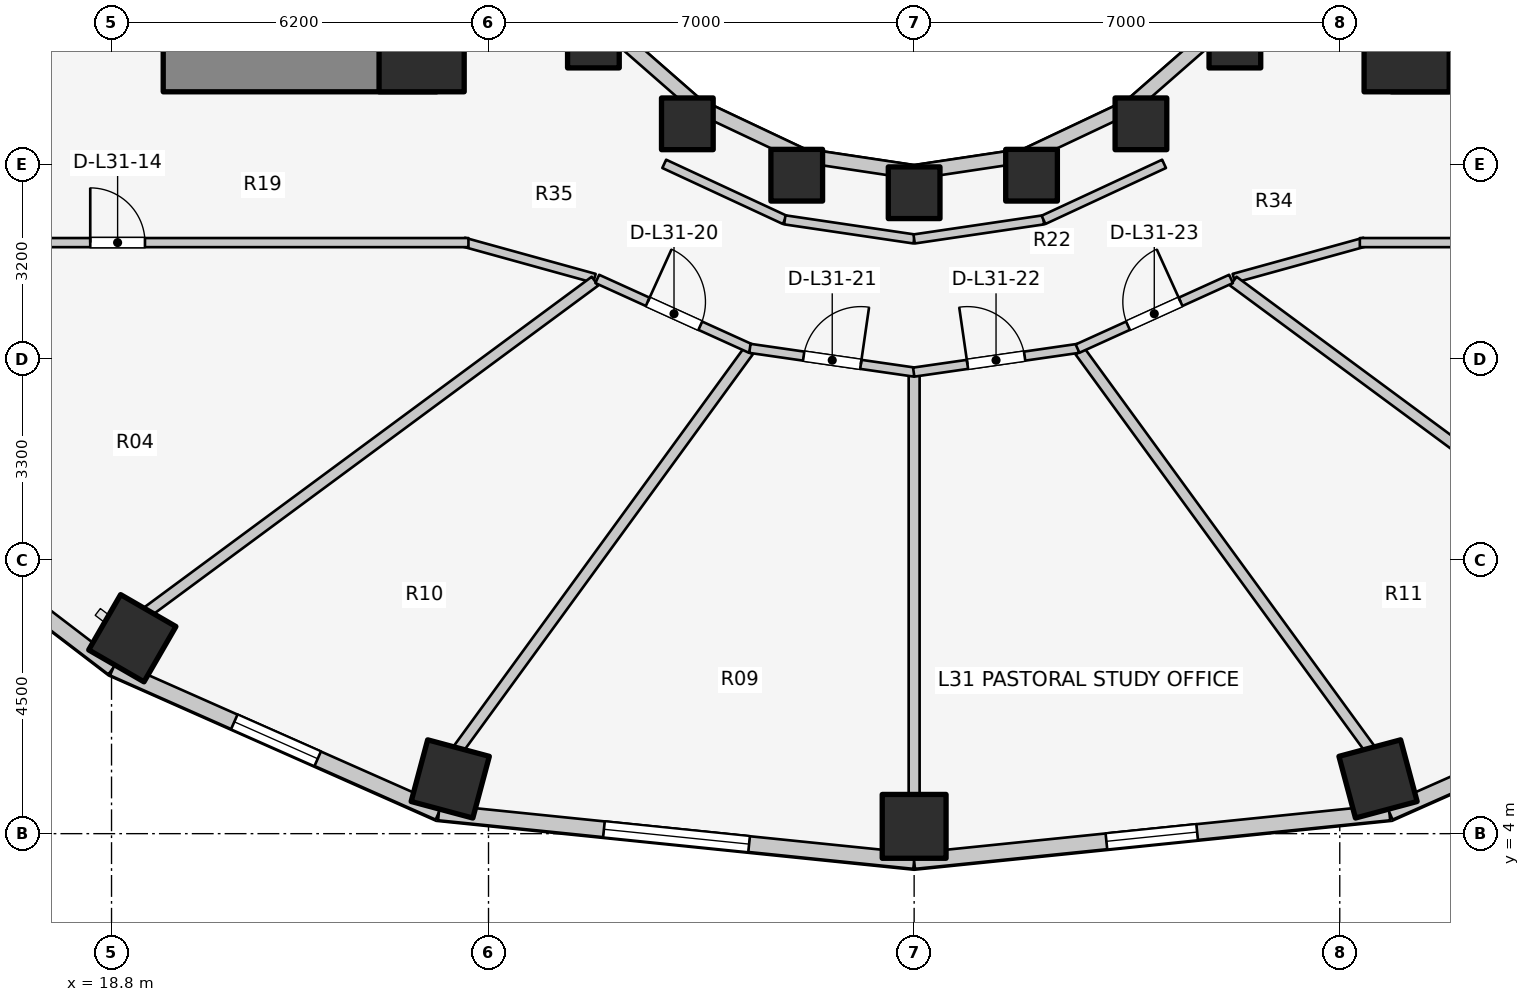
"""IFC4 building model, lengths in metres.
Left out: names, types, materials, properties, quantities, classifications, styles, units other than length and angle.
Written with IfcOpenShell. Run it as: python <this file> out.ifc"""

import sys

from ifc_helpers import new_model, si_unit, direction, frame, frame_2d, origin, origin_2d, place, context, subcontext, project, spatial, rectangle, extrude, element, fill, save


model = new_model("IFC4")
c1 = context("Model", 3, precision=1e-05, world=origin(), true_north=direction((0.0, 1.0)))
c2 = subcontext(c1, "Body", "Model", "MODEL_VIEW")
j1 = project(units=[si_unit("LENGTHUNIT", "METRE"), si_unit("PLANEANGLEUNIT", "RADIAN")], contexts=[c1])
p1 = place(None, origin())
s1 = spatial("IfcSite", under=j1, at=p1, CompositionType="ELEMENT")
p2 = place(p1, origin())
s2 = spatial("IfcBuilding", under=s1, at=p2, CompositionType="ELEMENT")
p3 = place(p2, frame((0.0, 0.0, 104.2)))
s3 = spatial("IfcBuildingStorey", under=s2, at=p3, CompositionType="ELEMENT", Elevation=104.2)
for number, where, z_axis, x_axis in (
    (1, (19.65, 16.55, 0.0), (0.0, 0.0, 1.0), (1.0, 0.0, 0.0)),
    (2, (39.85, 16.55, 0.0), (0.0, 0.0, 1.0), (1.0, 0.0, 0.0)),
):
    element("IfcWall", number, at=place(p3, frame(where, z_axis=z_axis, x_axis=x_axis)), inside=s3, PredefinedType="SHEAR", context=c2, shape_type="SweptSolid", body=[
        extrude(rectangle(XDim=4.5, YDim=0.7, at=frame_2d((2.25, 0.0))), origin(), (0.0, 0.0, 1.0), 3.1),
    ])
for number, where, z_axis, x_axis in (
    (3, (23.9, 16.9, 0.0), (0.0, 0.0, 1.0), (1.0, 0.0, 0.0)),
    (4, (40.1, 16.9, 0.0), (0.0, 0.0, 1.0), (1.0, 0.0, 0.0)),
):
    element("IfcColumn", number, at=place(p3, frame(where, z_axis=z_axis, x_axis=x_axis)), inside=s3, PredefinedType="COLUMN", context=c2, shape_type="SweptSolid", body=[
        extrude(rectangle(XDim=1.4, YDim=1.4, at=origin_2d()), origin(), (0.0, 0.0, 1.0), 3.1),
    ])
for number, where, z_axis, x_axis in (
    (5, (26.725, 17.018, 0.0), (0.0, 0.0, 1.0), (1.0, 0.0, 0.0)),
    (6, (28.27, 15.673, 0.0), (0.0, 0.0, 1.0), (1.0, 0.0, 0.0)),
):
    element("IfcColumn", number, at=place(p3, frame(where, z_axis=z_axis, x_axis=x_axis)), inside=s3, PredefinedType="COLUMN", context=c2, shape_type="SweptSolid", body=[
        extrude(rectangle(XDim=0.85, YDim=0.85, at=origin_2d()), origin(), (0.0, 0.0, 1.0), 3.1),
    ])
p4 = place(p3, frame((19.142, 7.214, 0.0), z_axis=(0.0, 0.0, 1.0), x_axis=(-0.5, -0.866025403784, 0.0)))
e7 = element("IfcColumn", 7, at=p4, inside=s3, PredefinedType="COLUMN", context=c2, shape_type="SweptSolid", body=[
    extrude(rectangle(XDim=1.05, YDim=1.05, at=origin_2d()), origin(), (0.0, 0.0, 1.0), 3.1),
])
p5 = place(p3, frame((30.069, 14.828, 0.0), z_axis=(0.0, 0.0, 1.0), x_axis=(1.0, 0.0, 0.0)))
e8 = element("IfcColumn", 8, at=p5, inside=s3, PredefinedType="COLUMN", context=c2, shape_type="SweptSolid", body=[
    extrude(rectangle(XDim=0.85, YDim=0.85, at=origin_2d()), origin(), (0.0, 0.0, 1.0), 3.1),
])
p6 = place(p3, frame((24.371, 4.9, 0.0), z_axis=(0.0, 0.0, 1.0), x_axis=(-0.258819045103, -0.965925826289, 0.0)))
e9 = element("IfcColumn", 9, at=p6, inside=s3, PredefinedType="COLUMN", context=c2, shape_type="SweptSolid", body=[
    extrude(rectangle(XDim=1.05, YDim=1.05, at=origin_2d()), origin(), (0.0, 0.0, 1.0), 3.1),
])
p7 = place(p3, frame((32.0, 14.54, 0.0), z_axis=(0.0, 0.0, 1.0), x_axis=(1.0, 0.0, 0.0)))
e10 = element("IfcColumn", 10, at=p7, inside=s3, PredefinedType="COLUMN", context=c2, shape_type="SweptSolid", body=[
    extrude(rectangle(XDim=0.85, YDim=0.85, at=origin_2d()), origin(), (0.0, 0.0, 1.0), 3.1),
])
p8 = place(p3, frame((32.0, 4.12, 0.0), z_axis=(0.0, 0.0, 1.0), x_axis=(0.0, -1.0, 0.0)))
e11 = element("IfcColumn", 11, at=p8, inside=s3, PredefinedType="COLUMN", context=c2, shape_type="SweptSolid", body=[
    extrude(rectangle(XDim=1.05, YDim=1.05, at=origin_2d()), origin(), (0.0, 0.0, 1.0), 3.1),
])
p9 = place(p3, frame((33.931, 14.828, 0.0), z_axis=(0.0, 0.0, 1.0), x_axis=(1.0, 0.0, 0.0)))
e12 = element("IfcColumn", 12, at=p9, inside=s3, PredefinedType="COLUMN", context=c2, shape_type="SweptSolid", body=[
    extrude(rectangle(XDim=0.85, YDim=0.85, at=origin_2d()), origin(), (0.0, 0.0, 1.0), 3.1),
])
p10 = place(p3, frame((39.629, 4.9, 0.0), z_axis=(0.0, 0.0, 1.0), x_axis=(0.258819045103, -0.965925826289, 0.0)))
e13 = element("IfcColumn", 13, at=p10, inside=s3, PredefinedType="COLUMN", context=c2, shape_type="SweptSolid", body=[
    extrude(rectangle(XDim=1.05, YDim=1.05, at=origin_2d()), origin(), (0.0, 0.0, 1.0), 3.1),
])
for number, where, z_axis, x_axis in (
    (14, (35.73, 15.673, 0.0), (0.0, 0.0, 1.0), (1.0, 0.0, 0.0)),
    (15, (37.275, 17.018, 0.0), (0.0, 0.0, 1.0), (1.0, 0.0, 0.0)),
):
    element("IfcColumn", number, at=place(p3, frame(where, z_axis=z_axis, x_axis=x_axis)), inside=s3, PredefinedType="COLUMN", context=c2, shape_type="SweptSolid", body=[
        extrude(rectangle(XDim=0.85, YDim=0.85, at=origin_2d()), origin(), (0.0, 0.0, 1.0), 3.1),
    ])
p11 = place(p3, frame((26.965, 17.258, 0.0), z_axis=(0.0, 0.0, 1.0), x_axis=(0.752576694707, -0.658504607869, 0.0)))
e16 = element("IfcWall", 16, at=p11, inside=s3, PredefinedType="STANDARD", context=c2, shape_type="SweptSolid", body=[
    extrude(rectangle(XDim=1.959, YDim=0.23, at=frame_2d((0.98, 0.0))), origin(), (0.0, 0.0, 1.0), 2.16),
])
p12 = place(p3, frame((28.44, 15.968, 0.0), z_axis=(0.0, 0.0, 1.0), x_axis=(0.904179699603, -0.427152280606, 0.0)))
e17 = element("IfcWall", 17, at=p12, inside=s3, PredefinedType="STANDARD", context=c2, shape_type="SweptSolid", body=[
    extrude(rectangle(XDim=1.899, YDim=0.23, at=frame_2d((0.95, 0.0))), origin(), (0.0, 0.0, 1.0), 2.16),
])
for number, where, z_axis, x_axis in (
    (18, (30.157, 15.157, 0.0), (0.0, 0.0, 1.0), (0.989, -0.149, 0.0)),
    (19, (32.0, 14.88, 0.0), (0.0, 0.0, 1.0), (0.989, 0.149, 0.0)),
):
    element("IfcWall", number, at=place(p3, frame(where, z_axis=z_axis, x_axis=x_axis)), inside=s3, PredefinedType="STANDARD", context=c2, shape_type="SweptSolid", body=[
        extrude(rectangle(XDim=1.864, YDim=0.23, at=frame_2d((0.932, 0.0))), origin(), (0.0, 0.0, 1.0), 2.16),
    ])
p13 = place(p3, frame((33.843, 15.157, 0.0), z_axis=(0.0, 0.0, 1.0), x_axis=(0.904179699603, 0.427152280606, 0.0)))
e20 = element("IfcWall", 20, at=p13, inside=s3, PredefinedType="STANDARD", context=c2, shape_type="SweptSolid", body=[
    extrude(rectangle(XDim=1.899, YDim=0.23, at=frame_2d((0.95, 0.0))), origin(), (0.0, 0.0, 1.0), 2.16),
])
p14 = place(p3, frame((35.56, 15.968, 0.0), z_axis=(0.0, 0.0, 1.0), x_axis=(0.752576694707, 0.658504607869, 0.0)))
e21 = element("IfcWall", 21, at=p14, inside=s3, PredefinedType="STANDARD", context=c2, shape_type="SweptSolid", body=[
    extrude(rectangle(XDim=1.959, YDim=0.23, at=frame_2d((0.98, 0.0))), origin(), (0.0, 0.0, 1.0), 2.16),
])
p15 = place(p3, frame((14.734, 9.847, 0.0), z_axis=(0.0, 0.0, 1.0), x_axis=(0.794809810864, -0.606858603427, 0.0)))
e22 = element("IfcWall", 22, at=p15, inside=s3, PredefinedType="STANDARD", context=c2, shape_type="SweptSolid", body=[
    extrude(rectangle(XDim=5.149, YDim=0.26, at=frame_2d((2.575, 0.0))), origin(), (0.0, 0.0, 1.0), 2.85),
])
p16 = place(p3, frame((18.827, 6.722, 0.0), z_axis=(0.0, 0.0, 1.0), x_axis=(0.914336605747, -0.404955023911, 0.0)))
e23 = element("IfcWall", 23, at=p16, inside=s3, PredefinedType="STANDARD", context=c2, shape_type="SweptSolid", body=[
    extrude(rectangle(XDim=5.859, YDim=0.26, at=frame_2d((2.929, 0.0))), origin(), (0.0, 0.0, 1.0), 2.85),
])
p17 = place(p16, frame((2.179, 0.0, 0.75)))
e24 = element("IfcOpeningElement", 24, at=p17, cuts=e23, PredefinedType="OPENING", context=c2, shape_type="SweptSolid", body=[
    extrude(rectangle(XDim=1.5, YDim=1.6, at=frame_2d((0.75, 0.8))), frame((0.0, 0.14, 0.0), z_axis=(0.0, -1.0, 0.0), x_axis=(1.0, 0.0, 0.0)), (0.0, 0.0, 1.0), 0.28),
])
p18 = place(p3, frame((24.184, 4.349, 0.0), z_axis=(0.0, 0.0, 1.0), x_axis=(0.994821390558, -0.101638579726, 0.0)))
e25 = element("IfcWall", 25, at=p18, inside=s3, PredefinedType="STANDARD", context=c2, shape_type="SweptSolid", body=[
    extrude(rectangle(XDim=7.857, YDim=0.26, at=frame_2d((3.929, 0.0))), origin(), (0.0, 0.0, 1.0), 2.85),
])
p19 = place(p18, frame((2.729, 0.0, 0.75)))
e26 = element("IfcOpeningElement", 26, at=p19, cuts=e25, PredefinedType="OPENING", context=c2, shape_type="SweptSolid", body=[
    extrude(rectangle(XDim=2.4, YDim=1.7, at=frame_2d((1.2, 0.85))), frame((0.0, 0.14, 0.0), z_axis=(0.0, -1.0, 0.0), x_axis=(1.0, 0.0, 0.0)), (0.0, 0.0, 1.0), 0.28),
])
p20 = place(p3, frame((32.0, 3.551, 0.0), z_axis=(0.0, 0.0, 1.0), x_axis=(0.994821390558, 0.101638579726, 0.0)))
e27 = element("IfcWall", 27, at=p20, inside=s3, PredefinedType="STANDARD", context=c2, shape_type="SweptSolid", body=[
    extrude(rectangle(XDim=7.857, YDim=0.26, at=frame_2d((3.929, 0.0))), origin(), (0.0, 0.0, 1.0), 2.85),
])
p21 = place(p20, frame((3.178, 0.0, 0.75)))
e28 = element("IfcOpeningElement", 28, at=p21, cuts=e27, PredefinedType="OPENING", context=c2, shape_type="SweptSolid", body=[
    extrude(rectangle(XDim=1.5, YDim=1.6, at=frame_2d((0.75, 0.8))), frame((0.0, 0.14, 0.0), z_axis=(0.0, -1.0, 0.0), x_axis=(1.0, 0.0, 0.0)), (0.0, 0.0, 1.0), 0.28),
])
p22 = place(p3, frame((39.816, 4.349, 0.0), z_axis=(0.0, 0.0, 1.0), x_axis=(0.914336605747, 0.404955023911, 0.0)))
e29 = element("IfcWall", 29, at=p22, inside=s3, PredefinedType="STANDARD", context=c2, shape_type="SweptSolid", body=[
    extrude(rectangle(XDim=5.859, YDim=0.26, at=frame_2d((2.929, 0.0))), origin(), (0.0, 0.0, 1.0), 2.85),
])
p23 = place(p22, frame((2.179, 0.0, 0.75)))
e30 = element("IfcOpeningElement", 30, at=p23, cuts=e29, PredefinedType="OPENING", context=c2, shape_type="SweptSolid", body=[
    extrude(rectangle(XDim=1.5, YDim=1.6, at=frame_2d((0.75, 0.8))), frame((0.0, 0.14, 0.0), z_axis=(0.0, -1.0, 0.0), x_axis=(1.0, 0.0, 0.0)), (0.0, 0.0, 1.0), 0.28),
])
p24 = place(p3, frame((27.89, 15.015, 0.0), z_axis=(0.0, 0.0, 1.0), x_axis=(0.906943449489, -0.421252393975, 0.0)))
e31 = element("IfcWall", 31, at=p24, inside=s3, PredefinedType="PARTITIONING", context=c2, shape_type="SweptSolid", body=[
    extrude(rectangle(XDim=2.186, YDim=0.15, at=frame_2d((1.093, 0.0))), origin(), (0.0, 0.0, 1.0), 2.272),
])
for number, where, z_axis, x_axis in (
    (32, (29.873, 14.094, 0.0), (0.0, 0.0, 1.0), (0.989, -0.146, 0.0)),
    (33, (32.0, 13.78, 0.0), (0.0, 0.0, 1.0), (0.989, 0.146, 0.0)),
):
    element("IfcWall", number, at=place(p3, frame(where, z_axis=z_axis, x_axis=x_axis)), inside=s3, PredefinedType="PARTITIONING", context=c2, shape_type="SweptSolid", body=[
        extrude(rectangle(XDim=2.151, YDim=0.15, at=frame_2d((1.075, 0.0))), origin(), (0.0, 0.0, 1.0), 2.272),
    ])
p25 = place(p3, frame((34.127, 14.094, 0.0), z_axis=(0.0, 0.0, 1.0), x_axis=(0.906943449489, 0.421252393975, 0.0)))
e34 = element("IfcWall", 34, at=p25, inside=s3, PredefinedType="PARTITIONING", context=c2, shape_type="SweptSolid", body=[
    extrude(rectangle(XDim=2.186, YDim=0.15, at=frame_2d((1.093, 0.0))), origin(), (0.0, 0.0, 1.0), 2.272),
])
p26 = place(p3, frame((26.742, 13.133, 0.0), z_axis=(0.0, 0.0, 1.0), x_axis=(-0.963833843713, 0.266503886865, 0.0)))
e35 = element("IfcWall", 35, at=p26, inside=s3, PredefinedType="PARTITIONING", context=c2, shape_type="SweptSolid", body=[
    extrude(rectangle(XDim=2.232, YDim=0.15, at=frame_2d((1.116, 0.0))), origin(), (0.0, 0.0, 1.0), 2.272),
])
p27 = place(p3, frame((17.15, 13.72, 0.0), z_axis=(0.0, 0.0, 1.0), x_axis=(1.0, 0.0, 0.0)))
e36 = element("IfcWall", 36, at=p27, inside=s3, PredefinedType="PARTITIONING", context=c2, shape_type="SweptSolid", body=[
    extrude(rectangle(XDim=7.52, YDim=0.15, at=frame_2d((3.76, 0.0))), origin(), (0.0, 0.0, 1.0), 2.272),
])
p28 = place(p27, frame((1.3, 0.0, 0.0)))
e37 = element("IfcOpeningElement", 37, at=p28, cuts=e36, PredefinedType="OPENING", context=c2, shape_type="SweptSolid", body=[
    extrude(rectangle(XDim=0.9, YDim=2.1, at=frame_2d((0.45, 1.05))), frame((0.0, 0.085, 0.0), z_axis=(0.0, -1.0, 0.0), x_axis=(1.0, 0.0, 0.0)), (0.0, 0.0, 1.0), 0.17),
])
p29 = place(p3, frame((37.258, 13.133, 0.0), z_axis=(0.0, 0.0, 1.0), x_axis=(0.963833843713, 0.266503886865, 0.0)))
e38 = element("IfcWall", 38, at=p29, inside=s3, PredefinedType="PARTITIONING", context=c2, shape_type="SweptSolid", body=[
    extrude(rectangle(XDim=2.232, YDim=0.15, at=frame_2d((1.116, 0.0))), origin(), (0.0, 0.0, 1.0), 2.272),
])
p30 = place(p3, frame((39.33, 13.72, 0.0), z_axis=(0.0, 0.0, 1.0), x_axis=(1.0, 0.0, 0.0)))
e39 = element("IfcWall", 39, at=p30, inside=s3, PredefinedType="PARTITIONING", context=c2, shape_type="SweptSolid", body=[
    extrude(rectangle(XDim=7.52, YDim=0.15, at=frame_2d((3.76, 0.0))), origin(), (0.0, 0.0, 1.0), 2.272),
])
p31 = place(p30, frame((5.22, 0.0, 0.0)))
e40 = element("IfcOpeningElement", 40, at=p31, cuts=e39, PredefinedType="OPENING", context=c2, shape_type="SweptSolid", body=[
    extrude(rectangle(XDim=0.9, YDim=2.1, at=frame_2d((0.45, 1.05))), frame((0.0, 0.085, 0.0), z_axis=(0.0, -1.0, 0.0), x_axis=(1.0, 0.0, 0.0)), (0.0, 0.0, 1.0), 0.17),
])
p32 = place(p3, frame((26.751, 13.086, 0.0), z_axis=(0.0, 0.0, 1.0), x_axis=(-0.80430981394, -0.594210167533, 0.0)))
e41 = element("IfcWall", 41, at=p32, inside=s3, PredefinedType="PARTITIONING", context=c2, shape_type="SweptSolid", body=[
    extrude(rectangle(XDim=9.146, YDim=0.18, at=frame_2d((4.573, 0.0))), origin(), (0.0, 0.0, 1.0), 2.272),
])
p33 = place(p3, frame((29.273, 11.934, 0.0), z_axis=(0.0, 0.0, 1.0), x_axis=(-0.589042211476, -0.808102266486, 0.0)))
e42 = element("IfcWall", 42, at=p33, inside=s3, PredefinedType="PARTITIONING", context=c2, shape_type="SweptSolid", body=[
    extrude(rectangle(XDim=8.101, YDim=0.18, at=frame_2d((4.051, 0.0))), origin(), (0.0, 0.0, 1.0), 2.272),
])
p34 = place(p3, frame((32.0, 11.535, 0.0), z_axis=(0.0, 0.0, 1.0), x_axis=(0.0, -1.0, 0.0)))
e43 = element("IfcWall", 43, at=p34, inside=s3, PredefinedType="PARTITIONING", context=c2, shape_type="SweptSolid", body=[
    extrude(rectangle(XDim=6.91, YDim=0.18, at=frame_2d((3.455, 0.0))), origin(), (0.0, 0.0, 1.0), 2.272),
])
p35 = place(p3, frame((34.727, 11.934, 0.0), z_axis=(0.0, 0.0, 1.0), x_axis=(0.589042211476, -0.808102266486, 0.0)))
e44 = element("IfcWall", 44, at=p35, inside=s3, PredefinedType="PARTITIONING", context=c2, shape_type="SweptSolid", body=[
    extrude(rectangle(XDim=8.101, YDim=0.18, at=frame_2d((4.051, 0.0))), origin(), (0.0, 0.0, 1.0), 2.272),
])
p36 = place(p3, frame((37.249, 13.086, 0.0), z_axis=(0.0, 0.0, 1.0), x_axis=(0.80430981394, -0.594210167533, 0.0)))
e45 = element("IfcWall", 45, at=p36, inside=s3, PredefinedType="PARTITIONING", context=c2, shape_type="SweptSolid", body=[
    extrude(rectangle(XDim=9.146, YDim=0.18, at=frame_2d((4.573, 0.0))), origin(), (0.0, 0.0, 1.0), 2.272),
])
p37 = place(p3, frame((26.789, 13.123, 0.0), z_axis=(0.0, 0.0, 1.0), x_axis=(0.910568469686, -0.41335827319, 0.0)))
e46 = element("IfcWall", 46, at=p37, inside=s3, PredefinedType="PARTITIONING", context=c2, shape_type="SweptSolid", body=[
    extrude(rectangle(XDim=2.772, YDim=0.15, at=frame_2d((1.386, 0.0))), origin(), (0.0, 0.0, 1.0), 2.272),
])
p38 = place(p37, frame((0.911, 0.0, 0.0)))
e47 = element("IfcOpeningElement", 47, at=p38, cuts=e46, PredefinedType="OPENING", context=c2, shape_type="SweptSolid", body=[
    extrude(rectangle(XDim=0.95, YDim=2.1, at=frame_2d((0.475, 1.05))), frame((0.0, 0.085, 0.0), z_axis=(0.0, -1.0, 0.0), x_axis=(1.0, 0.0, 0.0)), (0.0, 0.0, 1.0), 0.17),
])
p39 = place(p3, frame((29.299, 11.981, 0.0), z_axis=(0.0, 0.0, 1.0), x_axis=(0.989748682384, -0.142819976611, 0.0)))
e48 = element("IfcWall", 48, at=p39, inside=s3, PredefinedType="PARTITIONING", context=c2, shape_type="SweptSolid", body=[
    extrude(rectangle(XDim=2.737, YDim=0.15, at=frame_2d((1.368, 0.0))), origin(), (0.0, 0.0, 1.0), 2.272),
])
p40 = place(p39, frame((0.893, 0.0, 0.0)))
e49 = element("IfcOpeningElement", 49, at=p40, cuts=e48, PredefinedType="OPENING", context=c2, shape_type="SweptSolid", body=[
    extrude(rectangle(XDim=0.95, YDim=2.1, at=frame_2d((0.475, 1.05))), frame((0.0, 0.085, 0.0), z_axis=(0.0, -1.0, 0.0), x_axis=(1.0, 0.0, 0.0)), (0.0, 0.0, 1.0), 0.17),
])
p41 = place(p3, frame((31.993, 11.59, 0.0), z_axis=(0.0, 0.0, 1.0), x_axis=(0.989748682384, 0.142819976611, 0.0)))
e50 = element("IfcWall", 50, at=p41, inside=s3, PredefinedType="PARTITIONING", context=c2, shape_type="SweptSolid", body=[
    extrude(rectangle(XDim=2.737, YDim=0.15, at=frame_2d((1.368, 0.0))), origin(), (0.0, 0.0, 1.0), 2.272),
])
p42 = place(p41, frame((0.893, 0.0, 0.0)))
e51 = element("IfcOpeningElement", 51, at=p42, cuts=e50, PredefinedType="OPENING", context=c2, shape_type="SweptSolid", body=[
    extrude(rectangle(XDim=0.95, YDim=2.1, at=frame_2d((0.475, 1.05))), frame((0.0, 0.085, 0.0), z_axis=(0.0, -1.0, 0.0), x_axis=(1.0, 0.0, 0.0)), (0.0, 0.0, 1.0), 0.17),
])
p43 = place(p3, frame((34.687, 11.977, 0.0), z_axis=(0.0, 0.0, 1.0), x_axis=(0.910568469686, 0.41335827319, 0.0)))
e52 = element("IfcWall", 52, at=p43, inside=s3, PredefinedType="PARTITIONING", context=c2, shape_type="SweptSolid", body=[
    extrude(rectangle(XDim=2.772, YDim=0.15, at=frame_2d((1.386, 0.0))), origin(), (0.0, 0.0, 1.0), 2.272),
])
p44 = place(p43, frame((0.911, 0.0, 0.0)))
e53 = element("IfcOpeningElement", 53, at=p44, cuts=e52, PredefinedType="OPENING", context=c2, shape_type="SweptSolid", body=[
    extrude(rectangle(XDim=0.95, YDim=2.1, at=frame_2d((0.475, 1.05))), frame((0.0, 0.085, 0.0), z_axis=(0.0, -1.0, 0.0), x_axis=(1.0, 0.0, 0.0)), (0.0, 0.0, 1.0), 0.17),
])
p45 = place(p17, origin())
e54 = element("IfcWindow", 54, at=p45, inside=s3, PartitioningType="SINGLE_PANEL", PredefinedType="WINDOW", context=c2, shape_type="SweptSolid", body=[
    extrude(rectangle(XDim=1.5, YDim=1.6, at=frame_2d((0.75, 0.8))), frame((0.0, 0.03, 0.0), z_axis=(0.0, -1.0, 0.0), x_axis=(1.0, 0.0, 0.0)), (0.0, 0.0, 1.0), 0.06),
])
fill(e24, e54)
p46 = place(p19, origin())
e55 = element("IfcWindow", 55, at=p46, inside=s3, PartitioningType="SINGLE_PANEL", PredefinedType="WINDOW", context=c2, shape_type="SweptSolid", body=[
    extrude(rectangle(XDim=2.4, YDim=1.7, at=frame_2d((1.2, 0.85))), frame((0.0, 0.03, 0.0), z_axis=(0.0, -1.0, 0.0), x_axis=(1.0, 0.0, 0.0)), (0.0, 0.0, 1.0), 0.06),
])
fill(e26, e55)
p47 = place(p21, origin())
e56 = element("IfcWindow", 56, at=p47, inside=s3, PartitioningType="SINGLE_PANEL", PredefinedType="WINDOW", context=c2, shape_type="SweptSolid", body=[
    extrude(rectangle(XDim=1.5, YDim=1.6, at=frame_2d((0.75, 0.8))), frame((0.0, 0.03, 0.0), z_axis=(0.0, -1.0, 0.0), x_axis=(1.0, 0.0, 0.0)), (0.0, 0.0, 1.0), 0.06),
])
fill(e28, e56)
p48 = place(p28, origin())
e57 = element("IfcDoor", 57, at=p48, inside=s3, OperationType="SINGLE_SWING_LEFT", PredefinedType="DOOR", context=c2, shape_type="SweptSolid", body=[
    extrude(rectangle(XDim=0.9, YDim=2.1, at=frame_2d((0.45, 1.05))), frame((0.0, 0.025, 0.0), z_axis=(0.0, -1.0, 0.0), x_axis=(1.0, 0.0, 0.0)), (0.0, 0.0, 1.0), 0.05),
])
fill(e37, e57)
p49 = place(p38, origin())
e58 = element("IfcDoor", 58, at=p49, inside=s3, OperationType="SINGLE_SWING_LEFT", PredefinedType="DOOR", context=c2, shape_type="SweptSolid", body=[
    extrude(rectangle(XDim=0.95, YDim=2.1, at=frame_2d((0.475, 1.05))), frame((0.0, 0.025, 0.0), z_axis=(0.0, -1.0, 0.0), x_axis=(1.0, 0.0, 0.0)), (0.0, 0.0, 1.0), 0.05),
])
fill(e47, e58)
p50 = place(p40, origin())
e59 = element("IfcDoor", 59, at=p50, inside=s3, OperationType="SINGLE_SWING_RIGHT", PredefinedType="DOOR", context=c2, shape_type="SweptSolid", body=[
    extrude(rectangle(XDim=0.95, YDim=2.1, at=frame_2d((0.475, 1.05))), frame((0.0, 0.025, 0.0), z_axis=(0.0, -1.0, 0.0), x_axis=(1.0, 0.0, 0.0)), (0.0, 0.0, 1.0), 0.05),
])
fill(e49, e59)
p51 = place(p42, origin())
e60 = element("IfcDoor", 60, at=p51, inside=s3, OperationType="SINGLE_SWING_LEFT", PredefinedType="DOOR", context=c2, shape_type="SweptSolid", body=[
    extrude(rectangle(XDim=0.95, YDim=2.1, at=frame_2d((0.475, 1.05))), frame((0.0, 0.025, 0.0), z_axis=(0.0, -1.0, 0.0), x_axis=(1.0, 0.0, 0.0)), (0.0, 0.0, 1.0), 0.05),
])
fill(e51, e60)
p52 = place(p44, origin())
e61 = element("IfcDoor", 61, at=p52, inside=s3, OperationType="SINGLE_SWING_RIGHT", PredefinedType="DOOR", context=c2, shape_type="SweptSolid", body=[
    extrude(rectangle(XDim=0.95, YDim=2.1, at=frame_2d((0.475, 1.05))), frame((0.0, 0.025, 0.0), z_axis=(0.0, -1.0, 0.0), x_axis=(1.0, 0.0, 0.0)), (0.0, 0.0, 1.0), 0.05),
])
fill(e53, e61)
save(model, sys.argv[1])
